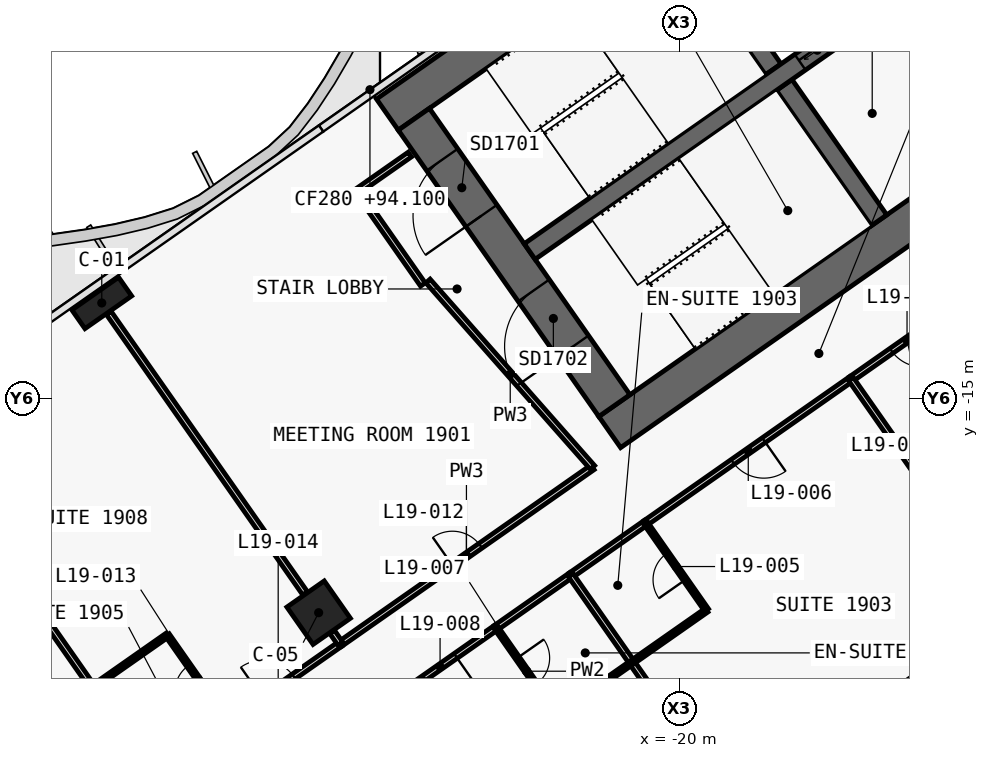
"""IFC4 building model, lengths in metres.
Left out: names, types, materials, properties, quantities, classifications, styles, units other than length and angle.
Written with IfcOpenShell. Run it as: python <this file> out.ifc"""

import sys

from ifc_helpers import new_model, si_unit, direction, frame, frame_2d, origin, origin_2d, place, context, subcontext, project, spatial, polyline, rectangle, outline, extrude, element, fill, save


model = new_model("IFC4")
c1 = context("Model", 3, precision=1e-05, world=origin(), true_north=direction((0.0, 1.0)))
c2 = subcontext(c1, "Body", "Model", "MODEL_VIEW")
j1 = project(units=[si_unit("LENGTHUNIT", "METRE"), si_unit("PLANEANGLEUNIT", "RADIAN")], contexts=[c1])
p1 = place(None, origin())
s1 = spatial("IfcSite", under=j1, at=p1, CompositionType="ELEMENT")
p2 = place(p1, origin())
s2 = spatial("IfcBuilding", under=s1, at=p2, CompositionType="ELEMENT")
p3 = place(p2, frame((0.0, 0.0, 94.1)))
s3 = spatial("IfcBuildingStorey", under=s2, at=p3, CompositionType="ELEMENT", Elevation=94.1)
p4 = place(p3, frame((0.037, 11.867, 0.0), z_axis=(0.0, 0.0, 1.0), x_axis=(-0.819155306259, -0.573571777746, 0.0)))
e1 = element("IfcWall", 1, at=p4, inside=s3, PredefinedType="SHEAR", context=c2, shape_type="SweptSolid", body=[
    extrude(outline(polyline([(33.837, 0.5), (0.7, 0.5), (0.0, -0.5), (33.837, -0.5), (33.837, 0.5)])), origin(), (0.0, 0.0, 1.0), 3.6),
])
p5 = place(p3, frame((0.037, -0.585, 0.0), z_axis=(0.0, 0.0, 1.0), x_axis=(-0.819157152511, -0.573569140985, 0.0)))
e2 = element("IfcWall", 2, at=p5, inside=s3, PredefinedType="SHEAR", context=c2, shape_type="SweptSolid", body=[
    extrude(outline(polyline([(26.695, 0.5), (0.7, 0.5), (0.0, -0.5), (26.695, -0.5), (26.695, 0.5)])), origin(), (0.0, 0.0, 1.0), 3.6),
])
p6 = place(p5, frame((2.995, 0.0, 0.0)))
e3 = element("IfcOpeningElement", 3, at=p6, cuts=e2, PredefinedType="OPENING", context=c2, shape_type="SweptSolid", body=[
    extrude(rectangle(XDim=2.4, YDim=2.1, at=frame_2d((1.2, 1.05))), frame((0.0, 0.51, 0.0), z_axis=(0.0, -1.0, 0.0), x_axis=(1.0, 0.0, 0.0)), (0.0, 0.0, 1.0), 1.02),
])
p7 = place(p5, frame((11.995, 0.0, 0.0)))
e4 = element("IfcOpeningElement", 4, at=p7, cuts=e2, PredefinedType="OPENING", context=c2, shape_type="SweptSolid", body=[
    extrude(rectangle(XDim=2.4, YDim=2.1, at=frame_2d((1.2, 1.05))), frame((0.0, 0.51, 0.0), z_axis=(0.0, -1.0, 0.0), x_axis=(1.0, 0.0, 0.0)), (0.0, 0.0, 1.0), 1.02),
])
p8 = place(p3, frame((-21.708, -15.2, 0.0), z_axis=(0.0, 0.0, 1.0), x_axis=(-0.573576324356, 0.819152122709, 0.0)))
e5 = element("IfcWall", 5, at=p8, inside=s3, PredefinedType="SHEAR", context=c2, shape_type="SweptSolid", body=[
    extrude(outline(polyline([(0.0, 0.5), (0.0, -0.5), (9.2, -0.5), (9.2, 0.5), (0.0, 0.5)])), origin(), (0.0, 0.0, 1.0), 3.6),
])
p9 = place(p8, frame((6.1, 0.0, 0.0)))
e6 = element("IfcOpeningElement", 6, at=p9, cuts=e5, PredefinedType="OPENING", context=c2, shape_type="SweptSolid", body=[
    extrude(rectangle(XDim=1.8, YDim=2.1, at=frame_2d((0.9, 1.05))), frame((0.0, 0.51, 0.0), z_axis=(0.0, -1.0, 0.0), x_axis=(1.0, 0.0, 0.0)), (0.0, 0.0, 1.0), 1.02),
])
p10 = place(p8, frame((1.9, 0.0, 0.0)))
e7 = element("IfcOpeningElement", 7, at=p10, cuts=e5, PredefinedType="OPENING", context=c2, shape_type="SweptSolid", body=[
    extrude(rectangle(XDim=1.8, YDim=2.1, at=frame_2d((0.9, 1.05))), frame((0.0, 0.51, 0.0), z_axis=(0.0, -1.0, 0.0), x_axis=(1.0, 0.0, 0.0)), (0.0, 0.0, 1.0), 1.02),
])
p11 = place(p3, frame((-14.745, -10.324, 0.0), z_axis=(0.0, 0.0, 1.0), x_axis=(-0.57356780395, 0.819158088694, 0.0)))
e8 = element("IfcWall", 8, at=p11, inside=s3, PredefinedType="SHEAR", context=c2, shape_type="SweptSolid", body=[
    extrude(outline(polyline([(4.35, 0.25), (0.0, 0.25), (0.0, -0.25), (4.35, -0.25), (4.35, 0.25)])), origin(), (0.0, 0.0, 1.0), 3.6),
])
p12 = place(p3, frame((-17.527, -6.352, 0.0), z_axis=(0.0, 0.0, 1.0), x_axis=(-0.573530143085, 0.819184457233, 0.0)))
e9 = element("IfcWall", 9, at=p12, inside=s3, PredefinedType="SHEAR", context=c2, shape_type="SweptSolid", body=[
    extrude(outline(polyline([(4.35, -0.25), (4.35, 0.25), (0.0, 0.25), (0.0, -0.25), (4.35, -0.25)])), origin(), (0.0, 0.0, 1.0), 3.6),
])
p13 = place(p3, frame((-2.638, 3.768, 0.0), z_axis=(0.0, 0.0, 1.0), x_axis=(-0.819148977158, -0.573580816643, 0.0)))
e10 = element("IfcWall", 10, at=p13, inside=s3, PredefinedType="SHEAR", context=c2, shape_type="SweptSolid", body=[
    extrude(outline(polyline([(26.0, 0.25), (0.0, 0.25), (0.0, -0.25), (26.0, -0.25), (26.0, 0.25)])), origin(), (0.0, 0.0, 1.0), 3.6),
])
p14 = place(p13, frame((1.169, 0.0, 0.0)))
e11 = element("IfcOpeningElement", 11, at=p14, cuts=e10, PredefinedType="OPENING", context=c2, shape_type="SweptSolid", body=[
    extrude(rectangle(XDim=1.1, YDim=2.1, at=frame_2d((0.55, 1.05))), frame((0.0, 0.26, 0.0), z_axis=(0.0, -1.0, 0.0), x_axis=(1.0, 0.0, 0.0)), (0.0, 0.0, 1.0), 0.52),
])
p15 = place(p13, frame((3.206, 0.0, 0.0)))
e12 = element("IfcOpeningElement", 12, at=p15, cuts=e10, PredefinedType="OPENING", context=c2, shape_type="SweptSolid", body=[
    extrude(rectangle(XDim=1.1, YDim=2.1, at=frame_2d((0.55, 1.05))), frame((0.0, 0.26, 0.0), z_axis=(0.0, -1.0, 0.0), x_axis=(1.0, 0.0, 0.0)), (0.0, 0.0, 1.0), 0.52),
])
p16 = place(p13, frame((5.244, 0.0, 0.0)))
e13 = element("IfcOpeningElement", 13, at=p16, cuts=e10, PredefinedType="OPENING", context=c2, shape_type="SweptSolid", body=[
    extrude(rectangle(XDim=1.1, YDim=2.1, at=frame_2d((0.55, 1.05))), frame((0.0, 0.26, 0.0), z_axis=(0.0, -1.0, 0.0), x_axis=(1.0, 0.0, 0.0)), (0.0, 0.0, 1.0), 0.52),
])
p17 = place(p13, frame((7.281, 0.0, 0.0)))
e14 = element("IfcOpeningElement", 14, at=p17, cuts=e10, PredefinedType="OPENING", context=c2, shape_type="SweptSolid", body=[
    extrude(rectangle(XDim=1.1, YDim=2.1, at=frame_2d((0.55, 1.05))), frame((0.0, 0.26, 0.0), z_axis=(0.0, -1.0, 0.0), x_axis=(1.0, 0.0, 0.0)), (0.0, 0.0, 1.0), 0.52),
])
p18 = place(p13, frame((9.688, 0.0, 0.0)))
e15 = element("IfcOpeningElement", 15, at=p18, cuts=e10, PredefinedType="OPENING", context=c2, shape_type="SweptSolid", body=[
    extrude(rectangle(XDim=1.1, YDim=2.1, at=frame_2d((0.55, 1.05))), frame((0.0, 0.26, 0.0), z_axis=(0.0, -1.0, 0.0), x_axis=(1.0, 0.0, 0.0)), (0.0, 0.0, 1.0), 0.52),
])
p19 = place(p13, frame((11.863, 0.0, 0.0)))
e16 = element("IfcOpeningElement", 16, at=p19, cuts=e10, PredefinedType="OPENING", context=c2, shape_type="SweptSolid", body=[
    extrude(rectangle(XDim=1.1, YDim=2.1, at=frame_2d((0.55, 1.05))), frame((0.0, 0.26, 0.0), z_axis=(0.0, -1.0, 0.0), x_axis=(1.0, 0.0, 0.0)), (0.0, 0.0, 1.0), 0.52),
])
p20 = place(p13, frame((14.038, 0.0, 0.0)))
e17 = element("IfcOpeningElement", 17, at=p20, cuts=e10, PredefinedType="OPENING", context=c2, shape_type="SweptSolid", body=[
    extrude(rectangle(XDim=1.1, YDim=2.1, at=frame_2d((0.55, 1.05))), frame((0.0, 0.26, 0.0), z_axis=(0.0, -1.0, 0.0), x_axis=(1.0, 0.0, 0.0)), (0.0, 0.0, 1.0), 0.52),
])
p21 = place(p13, frame((16.212, 0.0, 0.0)))
e18 = element("IfcOpeningElement", 18, at=p21, cuts=e10, PredefinedType="OPENING", context=c2, shape_type="SweptSolid", body=[
    extrude(rectangle(XDim=1.1, YDim=2.1, at=frame_2d((0.55, 1.05))), frame((0.0, 0.26, 0.0), z_axis=(0.0, -1.0, 0.0), x_axis=(1.0, 0.0, 0.0)), (0.0, 0.0, 1.0), 0.52),
])
p22 = place(p3, frame((-35.197, -12.498, 0.0), z_axis=(0.0, 0.0, 1.0), x_axis=(-0.819152044289, -0.573576436351, 0.0)))
e19 = element("IfcColumn", 19, at=p22, inside=s3, PredefinedType="COLUMN", context=c2, shape_type="SweptSolid", body=[
    extrude(rectangle(XDim=1.5, YDim=0.6, at=origin_2d()), origin(), (0.0, 0.0, 1.0), 3.6),
])
p23 = place(p3, frame((-29.49, -20.649, 0.0), z_axis=(0.0, 0.0, 1.0), x_axis=(-0.819152044289, -0.573576436351, 0.0)))
e20 = element("IfcColumn", 20, at=p23, inside=s3, PredefinedType="COLUMN", context=c2, shape_type="SweptSolid", body=[
    extrude(rectangle(XDim=1.2, YDim=1.2, at=origin_2d()), origin(), (0.0, 0.0, 1.0), 3.6),
])
p24 = place(p3, frame((-28.917, -21.469, 0.0), z_axis=(0.0, 0.0, 1.0), x_axis=(0.819152599934, 0.573575642807, 0.0)))
e21 = element("IfcWall", 21, at=p24, inside=s3, PredefinedType="PARTITIONING", context=c2, shape_type="SweptSolid", body=[
    extrude(rectangle(XDim=8.098, YDim=0.15, at=frame_2d((4.049, 0.0))), origin(), (0.0, 0.0, 1.0), 2.6),
])
p25 = place(p24, frame((3.599, 0.0, 0.0)))
e22 = element("IfcOpeningElement", 22, at=p25, cuts=e21, PredefinedType="OPENING", context=c2, shape_type="SweptSolid", body=[
    extrude(rectangle(XDim=0.9, YDim=2.1, at=frame_2d((0.45, 1.05))), frame((0.0, 0.085, 0.0), z_axis=(0.0, -1.0, 0.0), x_axis=(1.0, 0.0, 0.0)), (0.0, 0.0, 1.0), 0.17),
])
p26 = place(p3, frame((-31.866, -23.533, 0.0), z_axis=(0.0, 0.0, 1.0), x_axis=(0.819145961204, 0.573585123798, 0.0)))
e23 = element("IfcWall", 23, at=p26, inside=s3, PredefinedType="PARTITIONING", context=c2, shape_type="SweptSolid", body=[
    extrude(rectangle(XDim=3.603, YDim=0.15, at=frame_2d((1.802, 0.0))), origin(), (0.0, 0.0, 1.0), 2.6),
])
p27 = place(p26, frame((1.101, 0.0, 0.0)))
e24 = element("IfcOpeningElement", 24, at=p27, cuts=e23, PredefinedType="OPENING", context=c2, shape_type="SweptSolid", body=[
    extrude(rectangle(XDim=1.0, YDim=2.1, at=frame_2d((0.5, 1.05))), frame((0.0, 0.085, 0.0), z_axis=(0.0, -1.0, 0.0), x_axis=(1.0, 0.0, 0.0)), (0.0, 0.0, 1.0), 0.17),
])
p28 = place(p3, frame((-12.532, -12.437, 0.0), z_axis=(0.0, 0.0, 1.0), x_axis=(-0.819145961204, -0.573585123798, 0.0)))
e25 = element("IfcWall", 25, at=p28, inside=s3, PredefinedType="PARTITIONING", context=c2, shape_type="SweptSolid", body=[
    extrude(rectangle(XDim=3.603, YDim=0.15, at=frame_2d((1.802, 0.0))), origin(), (0.0, 0.0, 1.0), 2.6),
])
p29 = place(p28, frame((1.301, 0.0, 0.0)))
e26 = element("IfcOpeningElement", 26, at=p29, cuts=e25, PredefinedType="OPENING", context=c2, shape_type="SweptSolid", body=[
    extrude(rectangle(XDim=1.0, YDim=2.1, at=frame_2d((0.5, 1.05))), frame((0.0, 0.085, 0.0), z_axis=(0.0, -1.0, 0.0), x_axis=(1.0, 0.0, 0.0)), (0.0, 0.0, 1.0), 0.17),
])
p30 = place(p3, frame((-15.48, -14.501, 0.0), z_axis=(0.0, 0.0, 1.0), x_axis=(-0.819153746897, -0.573574004767, 0.0)))
e27 = element("IfcWall", 27, at=p30, inside=s3, PredefinedType="PARTITIONING", context=c2, shape_type="SweptSolid", body=[
    extrude(rectangle(XDim=6.603, YDim=0.15, at=frame_2d((3.302, 0.0))), origin(), (0.0, 0.0, 1.0), 2.6),
])
p31 = place(p30, frame((2.802, 0.0, 0.0)))
e28 = element("IfcOpeningElement", 28, at=p31, cuts=e27, PredefinedType="OPENING", context=c2, shape_type="SweptSolid", body=[
    extrude(rectangle(XDim=1.0, YDim=2.1, at=frame_2d((0.5, 1.05))), frame((0.0, 0.085, 0.0), z_axis=(0.0, -1.0, 0.0), x_axis=(1.0, 0.0, 0.0)), (0.0, 0.0, 1.0), 0.17),
])
p32 = place(p3, frame((-20.886, -18.287, 0.0), z_axis=(0.0, 0.0, 1.0), x_axis=(-0.819146032251, -0.573585022335, 0.0)))
e29 = element("IfcWall", 29, at=p32, inside=s3, PredefinedType="PARTITIONING", context=c2, shape_type="SweptSolid", body=[
    extrude(rectangle(XDim=2.404, YDim=0.15, at=frame_2d((1.202, 0.0))), origin(), (0.0, 0.0, 1.0), 3.32),
])
p33 = place(p3, frame((-24.819, -21.041, 0.0), z_axis=(0.0, 0.0, 1.0), x_axis=(-0.819145961204, -0.573585123798, 0.0)))
e30 = element("IfcWall", 30, at=p33, inside=s3, PredefinedType="PARTITIONING", context=c2, shape_type="SweptSolid", body=[
    extrude(rectangle(XDim=3.603, YDim=0.15, at=frame_2d((1.802, 0.0))), origin(), (0.0, 0.0, 1.0), 2.6),
])
p34 = place(p33, frame((1.301, 0.0, 0.0)))
e31 = element("IfcOpeningElement", 31, at=p34, cuts=e30, PredefinedType="OPENING", context=c2, shape_type="SweptSolid", body=[
    extrude(rectangle(XDim=1.0, YDim=2.1, at=frame_2d((0.5, 1.05))), frame((0.0, 0.085, 0.0), z_axis=(0.0, -1.0, 0.0), x_axis=(1.0, 0.0, 0.0)), (0.0, 0.0, 1.0), 0.17),
])
p35 = place(p3, frame((-22.852, -19.664, 0.0), z_axis=(0.0, 0.0, 1.0), x_axis=(-0.81911261637, -0.573632741136, 0.0)))
e32 = element("IfcWall", 32, at=p35, inside=s3, PredefinedType="PARTITIONING", context=c2, shape_type="SweptSolid", body=[
    extrude(rectangle(XDim=2.404, YDim=0.15, at=frame_2d((1.202, 0.0))), origin(), (0.0, 0.0, 1.0), 3.32),
])
p36 = place(p3, frame((-26.746, -12.014, 0.0), z_axis=(0.0, 0.0, 1.0), x_axis=(-0.573560650686, 0.819163097304, 0.0)))
e33 = element("IfcWall", 33, at=p36, inside=s3, PredefinedType="PARTITIONING", context=c2, shape_type="SweptSolid", body=[
    extrude(rectangle(XDim=3.0, YDim=0.15, at=frame_2d((1.5, 0.0))), origin(), (0.0, 0.0, 1.0), 3.32),
])
p37 = place(p3, frame((-28.467, -9.556, 0.0), z_axis=(0.0, 0.0, 1.0), x_axis=(0.819109000826, 0.573637903879, 0.0)))
e34 = element("IfcWall", 34, at=p37, inside=s3, PredefinedType="PARTITIONING", context=c2, shape_type="SweptSolid", body=[
    extrude(rectangle(XDim=1.68, YDim=0.15, at=frame_2d((0.84, 0.0))), origin(), (0.0, 0.0, 1.0), 3.32),
])
p38 = place(p3, frame((-22.284, -16.827, 0.0), z_axis=(0.0, 0.0, 1.0), x_axis=(-0.661545117561, 0.749905365651, 0.0)))
e35 = element("IfcWall", 35, at=p38, inside=s3, PredefinedType="PARTITIONING", context=c2, shape_type="SweptSolid", body=[
    extrude(rectangle(XDim=6.543, YDim=0.15, at=frame_2d((3.271, 0.0))), origin(), (0.0, 0.0, 1.0), 2.6),
])
p39 = place(p3, frame((-28.916, -21.468, 0.0), z_axis=(0.0, 0.0, 1.0), x_axis=(-0.572944929411, 0.819593867633, 0.0)))
e36 = element("IfcWall", 36, at=p39, inside=s3, PredefinedType="PARTITIONING", context=c2, shape_type="SweptSolid", body=[
    extrude(rectangle(XDim=0.38, YDim=0.15, at=frame_2d((0.19, 0.0))), origin(), (0.0, 0.0, 1.0), 2.6),
])
p40 = place(p3, frame((-29.845, -20.141, 0.0), z_axis=(0.0, 0.0, 1.0), x_axis=(-0.573558725113, 0.819164445546, 0.0)))
e37 = element("IfcWall", 37, at=p40, inside=s3, PredefinedType="PARTITIONING", context=c2, shape_type="SweptSolid", body=[
    extrude(rectangle(XDim=9.01, YDim=0.15, at=frame_2d((4.505, 0.0))), origin(), (0.0, 0.0, 1.0), 2.6),
])
p41 = place(p3, frame((-31.864, -23.532, 0.0), z_axis=(0.0, 0.0, 1.0), x_axis=(-0.573550118428, 0.819170471667, 0.0)))
e38 = element("IfcWall", 38, at=p41, inside=s3, PredefinedType="PARTITIONING", context=c2, shape_type="SweptSolid", body=[
    extrude(rectangle(XDim=2.8, YDim=0.12, at=frame_2d((1.4, 0.0))), origin(), (0.0, 0.0, 1.0), 2.6),
])
p42 = place(p41, frame((0.975, 0.0, 0.0)))
e39 = element("IfcOpeningElement", 39, at=p42, cuts=e38, PredefinedType="OPENING", context=c2, shape_type="SweptSolid", body=[
    extrude(rectangle(XDim=0.85, YDim=2.05, at=frame_2d((0.425, 1.025))), frame((0.0, 0.07, 0.0), z_axis=(0.0, -1.0, 0.0), x_axis=(1.0, 0.0, 0.0)), (0.0, 0.0, 1.0), 0.14),
])
p43 = place(p3, frame((-33.471, -21.238, 0.0), z_axis=(0.0, 0.0, 1.0), x_axis=(-0.819141114317, -0.573592045652, 0.0)))
e40 = element("IfcWall", 40, at=p43, inside=s3, PredefinedType="PARTITIONING", context=c2, shape_type="SweptSolid", body=[
    extrude(rectangle(XDim=2.4, YDim=0.12, at=frame_2d((1.2, 0.0))), origin(), (0.0, 0.0, 1.0), 3.32),
])
p44 = place(p3, frame((-35.438, -22.615, 0.0), z_axis=(0.0, 0.0, 1.0), x_axis=(-0.573553832693, 0.819167871076, 0.0)))
e41 = element("IfcWall", 41, at=p44, inside=s3, PredefinedType="PARTITIONING", context=c2, shape_type="SweptSolid", body=[
    extrude(rectangle(XDim=7.343, YDim=0.15, at=frame_2d((3.671, 0.0))), origin(), (0.0, 0.0, 1.0), 3.32),
])
p45 = place(p3, frame((-11.294, -20.482, 0.0), z_axis=(0.0, 0.0, 1.0), x_axis=(-0.573572324301, 0.819154923562, 0.0)))
e42 = element("IfcWall", 42, at=p45, inside=s3, PredefinedType="PARTITIONING", context=c2, shape_type="SweptSolid", body=[
    extrude(rectangle(XDim=7.3, YDim=0.15, at=frame_2d((3.65, 0.0))), origin(), (0.0, 0.0, 1.0), 2.5),
])
p46 = place(p3, frame((-21.247, -21.959, 0.0), z_axis=(0.0, 0.0, 1.0), x_axis=(0.819141114317, 0.573592045652, 0.0)))
e43 = element("IfcWall", 43, at=p46, inside=s3, PredefinedType="PARTITIONING", context=c2, shape_type="SweptSolid", body=[
    extrude(rectangle(XDim=2.4, YDim=0.12, at=frame_2d((1.2, 0.0))), origin(), (0.0, 0.0, 1.0), 3.32),
])
p47 = place(p3, frame((-19.281, -20.581, 0.0), z_axis=(0.0, 0.0, 1.0), x_axis=(-0.573550118428, 0.819170471667, 0.0)))
e44 = element("IfcWall", 44, at=p47, inside=s3, PredefinedType="PARTITIONING", context=c2, shape_type="SweptSolid", body=[
    extrude(rectangle(XDim=2.8, YDim=0.12, at=frame_2d((1.4, 0.0))), origin(), (0.0, 0.0, 1.0), 3.32),
])
p48 = place(p47, frame((0.975, 0.0, 0.0)))
e45 = element("IfcOpeningElement", 45, at=p48, cuts=e44, PredefinedType="OPENING", context=c2, shape_type="SweptSolid", body=[
    extrude(rectangle(XDim=0.85, YDim=2.05, at=frame_2d((0.425, 1.025))), frame((0.0, 0.07, 0.0), z_axis=(0.0, -1.0, 0.0), x_axis=(1.0, 0.0, 0.0)), (0.0, 0.0, 1.0), 0.14),
])
p49 = place(p3, frame((-18.667, -25.645, 0.0), z_axis=(0.0, 0.0, 1.0), x_axis=(-0.573589807488, 0.819142681555, 0.0)))
e46 = element("IfcWall", 46, at=p49, inside=s3, PredefinedType="PARTITIONING", context=c2, shape_type="SweptSolid", body=[
    extrude(rectangle(XDim=4.499, YDim=0.15, at=frame_2d((2.25, 0.0))), origin(), (0.0, 0.0, 1.0), 2.5),
])
p50 = place(p3, frame((-21.248, -21.958, 0.0), z_axis=(0.0, 0.0, 1.0), x_axis=(-0.573550118428, 0.819170471667, 0.0)))
e47 = element("IfcWall", 47, at=p50, inside=s3, PredefinedType="PARTITIONING", context=c2, shape_type="SweptSolid", body=[
    extrude(rectangle(XDim=2.8, YDim=0.15, at=frame_2d((1.4, 0.0))), origin(), (0.0, 0.0, 1.0), 3.32),
])
p51 = place(p3, frame((-24.821, -21.042, 0.0), z_axis=(0.0, 0.0, 1.0), x_axis=(0.573591086599, -0.819141785879, 0.0)))
e48 = element("IfcWall", 48, at=p51, inside=s3, PredefinedType="PARTITIONING", context=c2, shape_type="SweptSolid", body=[
    extrude(rectangle(XDim=2.8, YDim=0.12, at=frame_2d((1.4, 0.0))), origin(), (0.0, 0.0, 1.0), 3.32),
])
p52 = place(p51, frame((0.975, 0.0, 0.0)))
e49 = element("IfcOpeningElement", 49, at=p52, cuts=e48, PredefinedType="OPENING", context=c2, shape_type="SweptSolid", body=[
    extrude(rectangle(XDim=0.85, YDim=2.05, at=frame_2d((0.425, 1.025))), frame((0.0, 0.07, 0.0), z_axis=(0.0, -1.0, 0.0), x_axis=(1.0, 0.0, 0.0)), (0.0, 0.0, 1.0), 0.14),
])
p53 = place(p3, frame((-23.213, -23.336, 0.0), z_axis=(0.0, 0.0, 1.0), x_axis=(0.819155442668, 0.573571582932, 0.0)))
e50 = element("IfcWall", 50, at=p53, inside=s3, PredefinedType="PARTITIONING", context=c2, shape_type="SweptSolid", body=[
    extrude(rectangle(XDim=2.4, YDim=0.12, at=frame_2d((1.2, 0.0))), origin(), (0.0, 0.0, 1.0), 3.32),
])
p54 = place(p21, origin())
e51 = element("IfcDoor", 51, at=p54, inside=s3, OperationType="SLIDING_TO_RIGHT", PredefinedType="DOOR", context=c2, shape_type="SweptSolid", body=[
    extrude(rectangle(XDim=1.1, YDim=2.1, at=frame_2d((0.55, 1.05))), frame((0.0, 0.025, 0.0), z_axis=(0.0, -1.0, 0.0), x_axis=(1.0, 0.0, 0.0)), (0.0, 0.0, 1.0), 0.05),
])
fill(e18, e51)
p55 = place(p9, origin())
e52 = element("IfcDoor", 52, at=p55, inside=s3, OperationType="DOUBLE_DOOR_SINGLE_SWING", PredefinedType="DOOR", context=c2, shape_type="SweptSolid", body=[
    extrude(rectangle(XDim=1.8, YDim=2.1, at=frame_2d((0.9, 1.05))), frame((0.0, 0.025, 0.0), z_axis=(0.0, -1.0, 0.0), x_axis=(1.0, 0.0, 0.0)), (0.0, 0.0, 1.0), 0.05),
])
fill(e6, e52)
p56 = place(p10, origin())
e53 = element("IfcDoor", 53, at=p56, inside=s3, OperationType="DOUBLE_DOOR_SINGLE_SWING", PredefinedType="DOOR", context=c2, shape_type="SweptSolid", body=[
    extrude(rectangle(XDim=1.8, YDim=2.1, at=frame_2d((0.9, 1.05))), frame((0.0, 0.025, 0.0), z_axis=(0.0, -1.0, 0.0), x_axis=(1.0, 0.0, 0.0)), (0.0, 0.0, 1.0), 0.05),
])
fill(e7, e53)
p57 = place(p29, origin())
e54 = element("IfcDoor", 54, at=p57, inside=s3, OperationType="SINGLE_SWING_RIGHT", PredefinedType="DOOR", context=c2, shape_type="SweptSolid", body=[
    extrude(rectangle(XDim=1.0, YDim=2.1, at=frame_2d((0.5, 1.05))), frame((0.0, 0.025, 0.0), z_axis=(0.0, -1.0, 0.0), x_axis=(1.0, 0.0, 0.0)), (0.0, 0.0, 1.0), 0.05),
])
fill(e26, e54)
p58 = place(p48, origin())
e55 = element("IfcDoor", 55, at=p58, inside=s3, OperationType="SINGLE_SWING_LEFT", PredefinedType="DOOR", context=c2, shape_type="SweptSolid", body=[
    extrude(rectangle(XDim=0.85, YDim=2.05, at=frame_2d((0.425, 1.025))), frame((0.0, 0.025, 0.0), z_axis=(0.0, -1.0, 0.0), x_axis=(1.0, 0.0, 0.0)), (0.0, 0.0, 1.0), 0.05),
])
fill(e45, e55)
p59 = place(p31, origin())
e56 = element("IfcDoor", 56, at=p59, inside=s3, OperationType="SINGLE_SWING_LEFT", PredefinedType="DOOR", context=c2, shape_type="SweptSolid", body=[
    extrude(rectangle(XDim=1.0, YDim=2.1, at=frame_2d((0.5, 1.05))), frame((0.0, 0.025, 0.0), z_axis=(0.0, -1.0, 0.0), x_axis=(1.0, 0.0, 0.0)), (0.0, 0.0, 1.0), 0.05),
])
fill(e28, e56)
p60 = place(p52, origin())
e57 = element("IfcDoor", 57, at=p60, inside=s3, OperationType="SINGLE_SWING_LEFT", PredefinedType="DOOR", context=c2, shape_type="SweptSolid", body=[
    extrude(rectangle(XDim=0.85, YDim=2.05, at=frame_2d((0.425, 1.025))), frame((0.0, 0.025, 0.0), z_axis=(0.0, -1.0, 0.0), x_axis=(1.0, 0.0, 0.0)), (0.0, 0.0, 1.0), 0.05),
])
fill(e49, e57)
p61 = place(p34, origin())
e58 = element("IfcDoor", 58, at=p61, inside=s3, OperationType="SINGLE_SWING_RIGHT", PredefinedType="DOOR", context=c2, shape_type="SweptSolid", body=[
    extrude(rectangle(XDim=1.0, YDim=2.1, at=frame_2d((0.5, 1.05))), frame((0.0, 0.025, 0.0), z_axis=(0.0, -1.0, 0.0), x_axis=(1.0, 0.0, 0.0)), (0.0, 0.0, 1.0), 0.05),
])
fill(e31, e58)
p62 = place(p25, origin())
e59 = element("IfcDoor", 59, at=p62, inside=s3, OperationType="SINGLE_SWING_RIGHT", PredefinedType="DOOR", context=c2, shape_type="SweptSolid", body=[
    extrude(rectangle(XDim=0.9, YDim=2.1, at=frame_2d((0.45, 1.05))), frame((0.0, 0.025, 0.0), z_axis=(0.0, -1.0, 0.0), x_axis=(1.0, 0.0, 0.0)), (0.0, 0.0, 1.0), 0.05),
])
fill(e22, e59)
p63 = place(p42, origin())
e60 = element("IfcDoor", 60, at=p63, inside=s3, OperationType="SINGLE_SWING_LEFT", PredefinedType="DOOR", context=c2, shape_type="SweptSolid", body=[
    extrude(rectangle(XDim=0.85, YDim=2.05, at=frame_2d((0.425, 1.025))), frame((0.0, 0.025, 0.0), z_axis=(0.0, -1.0, 0.0), x_axis=(1.0, 0.0, 0.0)), (0.0, 0.0, 1.0), 0.05),
])
fill(e39, e60)
p64 = place(p27, origin())
e61 = element("IfcDoor", 61, at=p64, inside=s3, OperationType="SINGLE_SWING_RIGHT", PredefinedType="DOOR", context=c2, shape_type="SweptSolid", body=[
    extrude(rectangle(XDim=1.0, YDim=2.1, at=frame_2d((0.5, 1.05))), frame((0.0, 0.025, 0.0), z_axis=(0.0, -1.0, 0.0), x_axis=(1.0, 0.0, 0.0)), (0.0, 0.0, 1.0), 0.05),
])
fill(e24, e61)
save(model, sys.argv[1])
